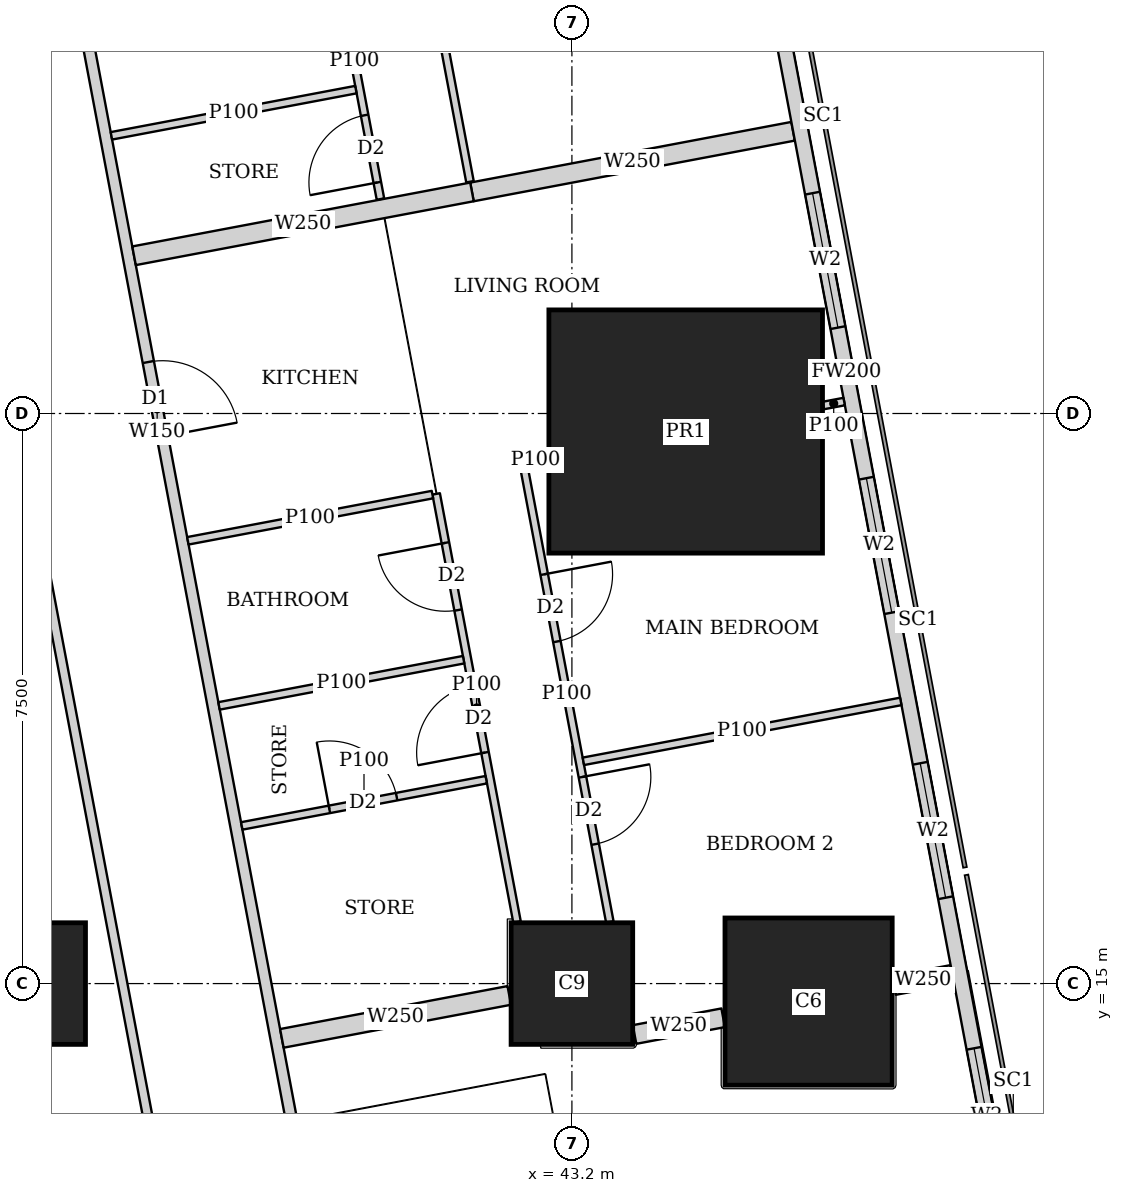
"""IFC4 building model, lengths in metres.
Left out: names, types, materials, properties, quantities, classifications, styles, units other than length and angle.
Written with IfcOpenShell. Run it as: python <this file> out.ifc"""

import sys

from ifc_helpers import new_model, si_unit, direction, frame, frame_2d, origin, origin_2d, place, context, subcontext, project, spatial, rectangle, extrude, element, fill, save


model = new_model("IFC4")
c1 = context("Model", 3, precision=1e-05, world=origin(), true_north=direction((0.0, 1.0)))
c2 = subcontext(c1, "Body", "Model", "MODEL_VIEW")
j1 = project(units=[si_unit("LENGTHUNIT", "METRE"), si_unit("PLANEANGLEUNIT", "RADIAN")], contexts=[c1])
p1 = place(None, origin())
s1 = spatial("IfcSite", under=j1, at=p1, CompositionType="ELEMENT")
p2 = place(p1, origin())
s2 = spatial("IfcBuilding", under=s1, at=p2, CompositionType="ELEMENT")
p3 = place(p2, frame((0.0, 0.0, 126.65)))
s3 = spatial("IfcBuildingStorey", under=s2, at=p3, CompositionType="ELEMENT", Elevation=126.65)
for number, where, z_axis, x_axis in (
    (1, (36.0, 15.0, 0.0), (0.0, 0.0, 1.0), (1.0, 0.0, 0.0)),
    (2, (43.2, 15.0, 0.0), (0.0, 0.0, 1.0), (1.0, 0.0, 0.0)),
):
    element("IfcColumn", number, at=place(p3, frame(where, z_axis=z_axis, x_axis=x_axis)), inside=s3, PredefinedType="COLUMN", context=c2, shape_type="SweptSolid", body=[
        extrude(rectangle(XDim=1.6, YDim=1.6, at=origin_2d()), origin(), (0.0, 0.0, 1.0), 3.75),
    ])
p4 = place(p3, frame((46.314, 14.763, 0.0), z_axis=(0.0, 0.0, 1.0), x_axis=(1.0, 0.0, 0.0)))
e3 = element("IfcColumn", 3, at=p4, inside=s3, PredefinedType="COLUMN", context=c2, shape_type="SweptSolid", body=[
    extrude(rectangle(XDim=2.2, YDim=2.2, at=origin_2d()), origin(), (0.0, 0.0, 1.0), 3.75),
])
p5 = place(p3, frame((44.697, 22.263, 0.0), z_axis=(0.0, 0.0, 1.0), x_axis=(1.0, 0.0, 0.0)))
e4 = element("IfcColumn", 4, at=p5, inside=s3, PredefinedType="COLUMN", context=c2, shape_type="SweptSolid", body=[
    extrude(rectangle(XDim=3.6, YDim=3.2, at=origin_2d()), origin(), (0.0, 0.0, 1.0), 3.75),
])
p6 = place(p3, frame((50.653, 2.703, 0.0), z_axis=(0.0, 0.0, 1.0), x_axis=(-0.185612026696, 0.982623109613, 0.0)))
e5 = element("IfcWall", 5, at=p6, inside=s3, PredefinedType="SOLIDWALL", context=c2, shape_type="SweptSolid", body=[
    extrude(rectangle(XDim=41.393, YDim=0.2, at=frame_2d((20.697, 0.0))), origin(), (0.0, 0.0, 1.0), 3.45),
])
p7 = place(p6, frame((1.633, 0.0, 0.9)))
e6 = element("IfcOpeningElement", 6, at=p7, cuts=e5, PredefinedType="OPENING", context=c2, shape_type="SweptSolid", body=[
    extrude(rectangle(XDim=1.8, YDim=1.5, at=frame_2d((0.9, 0.75))), frame((0.0, 0.11, 0.0), z_axis=(0.0, -1.0, 0.0), x_axis=(1.0, 0.0, 0.0)), (0.0, 0.0, 1.0), 0.22),
])
p8 = place(p6, frame((6.032, 0.0, 0.9)))
e7 = element("IfcOpeningElement", 7, at=p8, cuts=e5, PredefinedType="OPENING", context=c2, shape_type="SweptSolid", body=[
    extrude(rectangle(XDim=1.8, YDim=1.5, at=frame_2d((0.9, 0.75))), frame((0.0, 0.11, 0.0), z_axis=(0.0, -1.0, 0.0), x_axis=(1.0, 0.0, 0.0)), (0.0, 0.0, 1.0), 0.22),
])
p9 = place(p6, frame((9.848, 0.0, 0.9)))
e8 = element("IfcOpeningElement", 8, at=p9, cuts=e5, PredefinedType="OPENING", context=c2, shape_type="SweptSolid", body=[
    extrude(rectangle(XDim=1.8, YDim=1.5, at=frame_2d((0.9, 0.75))), frame((0.0, 0.11, 0.0), z_axis=(0.0, -1.0, 0.0), x_axis=(1.0, 0.0, 0.0)), (0.0, 0.0, 1.0), 0.22),
])
p10 = place(p6, frame((13.664, 0.0, 0.9)))
e9 = element("IfcOpeningElement", 9, at=p10, cuts=e5, PredefinedType="OPENING", context=c2, shape_type="SweptSolid", body=[
    extrude(rectangle(XDim=1.8, YDim=1.5, at=frame_2d((0.9, 0.75))), frame((0.0, 0.11, 0.0), z_axis=(0.0, -1.0, 0.0), x_axis=(1.0, 0.0, 0.0)), (0.0, 0.0, 1.0), 0.22),
])
p11 = place(p6, frame((17.481, 0.0, 0.9)))
e10 = element("IfcOpeningElement", 10, at=p11, cuts=e5, PredefinedType="OPENING", context=c2, shape_type="SweptSolid", body=[
    extrude(rectangle(XDim=1.8, YDim=1.5, at=frame_2d((0.9, 0.75))), frame((0.0, 0.11, 0.0), z_axis=(0.0, -1.0, 0.0), x_axis=(1.0, 0.0, 0.0)), (0.0, 0.0, 1.0), 0.22),
])
p12 = place(p6, frame((21.297, 0.0, 0.9)))
e11 = element("IfcOpeningElement", 11, at=p12, cuts=e5, PredefinedType="OPENING", context=c2, shape_type="SweptSolid", body=[
    extrude(rectangle(XDim=1.8, YDim=1.5, at=frame_2d((0.9, 0.75))), frame((0.0, 0.11, 0.0), z_axis=(0.0, -1.0, 0.0), x_axis=(1.0, 0.0, 0.0)), (0.0, 0.0, 1.0), 0.22),
])
p13 = place(p6, frame((25.113, 0.0, 0.9)))
e12 = element("IfcOpeningElement", 12, at=p13, cuts=e5, PredefinedType="OPENING", context=c2, shape_type="SweptSolid", body=[
    extrude(rectangle(XDim=1.8, YDim=1.5, at=frame_2d((0.9, 0.75))), frame((0.0, 0.11, 0.0), z_axis=(0.0, -1.0, 0.0), x_axis=(1.0, 0.0, 0.0)), (0.0, 0.0, 1.0), 0.22),
])
p14 = place(p6, frame((28.93, 0.0, 0.9)))
e13 = element("IfcOpeningElement", 13, at=p14, cuts=e5, PredefinedType="OPENING", context=c2, shape_type="SweptSolid", body=[
    extrude(rectangle(XDim=1.8, YDim=1.5, at=frame_2d((0.9, 0.75))), frame((0.0, 0.11, 0.0), z_axis=(0.0, -1.0, 0.0), x_axis=(1.0, 0.0, 0.0)), (0.0, 0.0, 1.0), 0.22),
])
p15 = place(p6, frame((32.746, 0.0, 0.9)))
e14 = element("IfcOpeningElement", 14, at=p15, cuts=e5, PredefinedType="OPENING", context=c2, shape_type="SweptSolid", body=[
    extrude(rectangle(XDim=1.8, YDim=1.5, at=frame_2d((0.9, 0.75))), frame((0.0, 0.11, 0.0), z_axis=(0.0, -1.0, 0.0), x_axis=(1.0, 0.0, 0.0)), (0.0, 0.0, 1.0), 0.22),
])
p16 = place(p6, frame((36.481, 0.0, 0.9)))
e15 = element("IfcOpeningElement", 15, at=p16, cuts=e5, PredefinedType="OPENING", context=c2, shape_type="SweptSolid", body=[
    extrude(rectangle(XDim=1.8, YDim=1.5, at=frame_2d((0.9, 0.75))), frame((0.0, 0.11, 0.0), z_axis=(0.0, -1.0, 0.0), x_axis=(1.0, 0.0, 0.0)), (0.0, 0.0, 1.0), 0.22),
])
p17 = place(p3, frame((33.896, 42.929, 0.0), z_axis=(0.0, 0.0, 1.0), x_axis=(0.1855961604, -0.982626106535, 0.0)))
e16 = element("IfcWall", 16, at=p17, inside=s3, PredefinedType="SOLIDWALL", context=c2, shape_type="SweptSolid", body=[
    extrude(rectangle(XDim=41.456, YDim=0.15, at=frame_2d((20.728, 0.0))), origin(), (0.0, 0.0, 1.0), 2.45),
])
p18 = place(p17, frame((7.893, 0.0, 0.0)))
e17 = element("IfcOpeningElement", 17, at=p18, cuts=e16, PredefinedType="OPENING", context=c2, shape_type="SweptSolid", body=[
    extrude(rectangle(XDim=1.0, YDim=2.1, at=frame_2d((0.5, 1.05))), frame((0.0, 0.085, 0.0), z_axis=(0.0, -1.0, 0.0), x_axis=(1.0, 0.0, 0.0)), (0.0, 0.0, 1.0), 0.17),
])
p19 = place(p17, frame((12.468, 0.0, 0.0)))
e18 = element("IfcOpeningElement", 18, at=p19, cuts=e16, PredefinedType="OPENING", context=c2, shape_type="SweptSolid", body=[
    extrude(rectangle(XDim=1.0, YDim=2.1, at=frame_2d((0.5, 1.05))), frame((0.0, 0.085, 0.0), z_axis=(0.0, -1.0, 0.0), x_axis=(1.0, 0.0, 0.0)), (0.0, 0.0, 1.0), 0.17),
])
p20 = place(p17, frame((20.101, 0.0, 0.0)))
e19 = element("IfcOpeningElement", 19, at=p20, cuts=e16, PredefinedType="OPENING", context=c2, shape_type="SweptSolid", body=[
    extrude(rectangle(XDim=1.0, YDim=2.1, at=frame_2d((0.5, 1.05))), frame((0.0, 0.085, 0.0), z_axis=(0.0, -1.0, 0.0), x_axis=(1.0, 0.0, 0.0)), (0.0, 0.0, 1.0), 0.17),
])
p21 = place(p17, frame((31.064, 0.0, 0.0)))
e20 = element("IfcOpeningElement", 20, at=p21, cuts=e16, PredefinedType="OPENING", context=c2, shape_type="SweptSolid", body=[
    extrude(rectangle(XDim=1.0, YDim=2.1, at=frame_2d((0.5, 1.05))), frame((0.0, 0.085, 0.0), z_axis=(0.0, -1.0, 0.0), x_axis=(1.0, 0.0, 0.0)), (0.0, 0.0, 1.0), 0.17),
])
p22 = place(p3, frame((41.156, 29.273, 0.0), z_axis=(0.0, 0.0, 1.0), x_axis=(0.185474762472, -0.982649028131, 0.0)))
e21 = element("IfcWall", 21, at=p22, inside=s3, PredefinedType="PARTITIONING", context=c2, shape_type="SweptSolid", body=[
    extrude(rectangle(XDim=3.79, YDim=0.1, at=frame_2d((1.895, 0.0))), origin(), (0.0, 0.0, 1.0), 2.45),
])
p23 = place(p22, frame((0.9, 0.0, 0.0)))
e22 = element("IfcOpeningElement", 22, at=p23, cuts=e21, PredefinedType="OPENING", context=c2, shape_type="SweptSolid", body=[
    extrude(rectangle(XDim=0.9, YDim=2.1, at=frame_2d((0.45, 1.05))), frame((0.0, 0.06, 0.0), z_axis=(0.0, -1.0, 0.0), x_axis=(1.0, 0.0, 0.0)), (0.0, 0.0, 1.0), 0.12),
])
p24 = place(p3, frame((39.997, 28.942, 0.0), z_axis=(0.0, 0.0, 1.0), x_axis=(0.185580474845, -0.982629069057, 0.0)))
e23 = element("IfcWall", 23, at=p24, inside=s3, PredefinedType="PARTITIONING", context=c2, shape_type="SweptSolid", body=[
    extrude(rectangle(XDim=3.685, YDim=0.1, at=frame_2d((1.842, 0.0))), origin(), (0.0, 0.0, 1.0), 3.45),
])
p25 = place(p24, frame((0.655, 0.0, 0.0)))
e24 = element("IfcOpeningElement", 24, at=p25, cuts=e23, PredefinedType="OPENING", context=c2, shape_type="SweptSolid", body=[
    extrude(rectangle(XDim=0.9, YDim=2.1, at=frame_2d((0.45, 1.05))), frame((0.0, 0.06, 0.0), z_axis=(0.0, -1.0, 0.0), x_axis=(1.0, 0.0, 0.0)), (0.0, 0.0, 1.0), 0.12),
])
p26 = place(p24, frame((2.563, 0.0, 0.0)))
e25 = element("IfcOpeningElement", 25, at=p26, cuts=e23, PredefinedType="OPENING", context=c2, shape_type="SweptSolid", body=[
    extrude(rectangle(XDim=0.9, YDim=2.1, at=frame_2d((0.45, 1.05))), frame((0.0, 0.06, 0.0), z_axis=(0.0, -1.0, 0.0), x_axis=(1.0, 0.0, 0.0)), (0.0, 0.0, 1.0), 0.12),
])
p27 = place(p3, frame((40.358, 26.761, 0.0), z_axis=(0.0, 0.0, 1.0), x_axis=(-0.982607776398, -0.185693181787, 0.0)))
e26 = element("IfcWall", 26, at=p27, inside=s3, PredefinedType="PARTITIONING", context=c2, shape_type="SweptSolid", body=[
    extrude(rectangle(XDim=3.274, YDim=0.1, at=frame_2d((1.637, 0.0))), origin(), (0.0, 0.0, 1.0), 3.45),
])
p28 = place(p3, frame((42.566, 21.809, 0.0), z_axis=(0.0, 0.0, 1.0), x_axis=(0.18559218796, -0.982626856832, 0.0)))
e27 = element("IfcWall", 27, at=p28, inside=s3, PredefinedType="PARTITIONING", context=c2, shape_type="SweptSolid", body=[
    extrude(rectangle(XDim=6.105, YDim=0.1, at=frame_2d((3.052, 0.0))), origin(), (0.0, 0.0, 1.0), 2.45),
])
p29 = place(p28, frame((1.45, 0.0, 0.0)))
e28 = element("IfcOpeningElement", 28, at=p29, cuts=e27, PredefinedType="OPENING", context=c2, shape_type="SweptSolid", body=[
    extrude(rectangle(XDim=0.9, YDim=2.1, at=frame_2d((0.45, 1.05))), frame((0.0, 0.06, 0.0), z_axis=(0.0, -1.0, 0.0), x_axis=(1.0, 0.0, 0.0)), (0.0, 0.0, 1.0), 0.12),
])
p30 = place(p28, frame((4.163, 0.0, 0.0)))
e29 = element("IfcOpeningElement", 29, at=p30, cuts=e27, PredefinedType="OPENING", context=c2, shape_type="SweptSolid", body=[
    extrude(rectangle(XDim=0.9, YDim=2.1, at=frame_2d((0.45, 1.05))), frame((0.0, 0.06, 0.0), z_axis=(0.0, -1.0, 0.0), x_axis=(1.0, 0.0, 0.0)), (0.0, 0.0, 1.0), 0.12),
])
p31 = place(p3, frame((41.414, 21.442, 0.0), z_axis=(0.0, 0.0, 1.0), x_axis=(0.185636022079, -0.982618576716, 0.0)))
e30 = element("IfcWall", 30, at=p31, inside=s3, PredefinedType="PARTITIONING", context=c2, shape_type="SweptSolid", body=[
    extrude(rectangle(XDim=5.731, YDim=0.1, at=frame_2d((2.866, 0.0))), origin(), (0.0, 0.0, 1.0), 3.45),
])
p32 = place(p31, frame((0.655, 0.0, 0.0)))
e31 = element("IfcOpeningElement", 31, at=p32, cuts=e30, PredefinedType="OPENING", context=c2, shape_type="SweptSolid", body=[
    extrude(rectangle(XDim=0.9, YDim=2.1, at=frame_2d((0.45, 1.05))), frame((0.0, 0.06, 0.0), z_axis=(0.0, -1.0, 0.0), x_axis=(1.0, 0.0, 0.0)), (0.0, 0.0, 1.0), 0.12),
])
p33 = place(p31, frame((2.563, 0.0, 0.0)))
e32 = element("IfcOpeningElement", 32, at=p33, cuts=e30, PredefinedType="OPENING", context=c2, shape_type="SweptSolid", body=[
    extrude(rectangle(XDim=0.9, YDim=2.1, at=frame_2d((0.45, 1.05))), frame((0.0, 0.06, 0.0), z_axis=(0.0, -1.0, 0.0), x_axis=(1.0, 0.0, 0.0)), (0.0, 0.0, 1.0), 0.12),
])
p34 = place(p3, frame((46.782, 22.657, 0.0), z_axis=(0.0, 0.0, 1.0), x_axis=(-0.982574553168, -0.185868898601, 0.0)))
e33 = element("IfcWall", 33, at=p34, inside=s3, PredefinedType="PARTITIONING", context=c2, shape_type="SweptSolid", body=[
    extrude(rectangle(XDim=0.28, YDim=0.1, at=frame_2d((0.14, 0.0))), origin(), (0.0, 0.0, 1.0), 3.45),
])
p35 = place(p3, frame((42.887, 21.921, 0.0), z_axis=(0.0, 0.0, 1.0), x_axis=(-0.982274918032, -0.187445953293, 0.0)))
e34 = element("IfcWall", 34, at=p35, inside=s3, PredefinedType="PARTITIONING", context=c2, shape_type="SweptSolid", body=[
    extrude(rectangle(XDim=0.336, YDim=0.1, at=frame_2d((0.168, 0.0))), origin(), (0.0, 0.0, 1.0), 2.45),
])
p36 = place(p3, frame((47.527, 18.712, 0.0), z_axis=(0.0, 0.0, 1.0), x_axis=(-0.982665405803, -0.185387972203, 0.0)))
e35 = element("IfcWall", 35, at=p36, inside=s3, PredefinedType="PARTITIONING", context=c2, shape_type="SweptSolid", body=[
    extrude(rectangle(XDim=4.25, YDim=0.1, at=frame_2d((2.125, 0.0))), origin(), (0.0, 0.0, 1.0), 2.15),
])
p37 = place(p3, frame((41.365, 21.433, 0.0), z_axis=(0.0, 0.0, 1.0), x_axis=(-0.982607026909, -0.185697147715, 0.0)))
e36 = element("IfcWall", 36, at=p37, inside=s3, PredefinedType="PARTITIONING", context=c2, shape_type="SweptSolid", body=[
    extrude(rectangle(XDim=3.275, YDim=0.1, at=frame_2d((1.637, 0.0))), origin(), (0.0, 0.0, 1.0), 3.45),
])
p38 = place(p3, frame((42.073, 17.682, 0.0), z_axis=(0.0, 0.0, 1.0), x_axis=(-0.982610347627, -0.185679575441, 0.0)))
e37 = element("IfcWall", 37, at=p38, inside=s3, PredefinedType="PARTITIONING", context=c2, shape_type="SweptSolid", body=[
    extrude(rectangle(XDim=3.274, YDim=0.1, at=frame_2d((1.637, 0.0))), origin(), (0.0, 0.0, 1.0), 3.45),
])
p39 = place(p38, frame((1.2, 0.0, 0.0)))
e38 = element("IfcOpeningElement", 38, at=p39, cuts=e37, PredefinedType="OPENING", context=c2, shape_type="SweptSolid", body=[
    extrude(rectangle(XDim=0.9, YDim=2.1, at=frame_2d((0.45, 1.05))), frame((0.0, 0.06, 0.0), z_axis=(0.0, -1.0, 0.0), x_axis=(1.0, 0.0, 0.0)), (0.0, 0.0, 1.0), 0.12),
])
p40 = place(p3, frame((41.775, 19.261, 0.0), z_axis=(0.0, 0.0, 1.0), x_axis=(-0.982620626894, -0.185625169636, 0.0)))
e39 = element("IfcWall", 39, at=p40, inside=s3, PredefinedType="PARTITIONING", context=c2, shape_type="SweptSolid", body=[
    extrude(rectangle(XDim=3.275, YDim=0.1, at=frame_2d((1.637, 0.0))), origin(), (0.0, 0.0, 1.0), 3.45),
])
p41 = place(p3, frame((46.11, 26.213, 0.0), z_axis=(0.0, 0.0, 1.0), x_axis=(-0.982633535512, -0.185556823879, 0.0)))
e40 = element("IfcWall", 40, at=p41, inside=s3, PredefinedType="SOLIDWALL", context=c2, shape_type="SweptSolid", body=[
    extrude(rectangle(XDim=4.3, YDim=0.25, at=frame_2d((2.15, 0.0))), origin(), (0.0, 0.0, 1.0), 2.15),
])
p42 = place(p3, frame((41.885, 25.415, 0.0), z_axis=(0.0, 0.0, 1.0), x_axis=(-0.982612837616, -0.185666398014, 0.0)))
e41 = element("IfcWall", 41, at=p42, inside=s3, PredefinedType="SOLIDWALL", context=c2, shape_type="SweptSolid", body=[
    extrude(rectangle(XDim=4.525, YDim=0.25, at=frame_2d((2.262, 0.0))), origin(), (0.0, 0.0, 1.0), 3.45),
])
p43 = place(p3, frame((48.206, 15.12, 0.0), z_axis=(0.0, 0.0, 1.0), x_axis=(-0.982638023929, -0.185533053469, 0.0)))
e42 = element("IfcWall", 42, at=p43, inside=s3, PredefinedType="SOLIDWALL", context=c2, shape_type="SweptSolid", body=[
    extrude(rectangle(XDim=0.782, YDim=0.25, at=frame_2d((0.391, 0.0))), origin(), (0.0, 0.0, 1.0), 3.45),
])
p44 = place(p3, frame((45.19, 14.55, 0.0), z_axis=(0.0, 0.0, 1.0), x_axis=(-0.982666604435, -0.185381618634, 0.0)))
e43 = element("IfcWall", 43, at=p44, inside=s3, PredefinedType="SOLIDWALL", context=c2, shape_type="SweptSolid", body=[
    extrude(rectangle(XDim=1.187, YDim=0.25, at=frame_2d((0.593, 0.0))), origin(), (0.0, 0.0, 1.0), 3.45),
])
p45 = place(p3, frame((42.376, 14.844, 0.0), z_axis=(0.0, 0.0, 1.0), x_axis=(-0.982636286056, -0.185542257522, 0.0)))
e44 = element("IfcWall", 44, at=p45, inside=s3, PredefinedType="SOLIDWALL", context=c2, shape_type="SweptSolid", body=[
    extrude(rectangle(XDim=3.045, YDim=0.25, at=frame_2d((1.522, 0.0))), origin(), (0.0, 0.0, 1.0), 3.45),
])
p46 = place(p3, frame((38.202, 10.163, 0.0), z_axis=(0.0, 0.0, 1.0), x_axis=(-0.185610321132, 0.982623431783, 0.0)))
e45 = element("IfcWall", 45, at=p46, inside=s3, PredefinedType="PARTITIONING", context=c2, shape_type="SweptSolid", body=[
    extrude(rectangle(XDim=25.111, YDim=0.125, at=frame_2d((12.556, 0.0))), origin(), (0.0, 0.0, 1.0), 2.45),
])
p47 = place(p46, frame((0.708, 0.0, 0.0)))
e46 = element("IfcOpeningElement", 46, at=p47, cuts=e45, PredefinedType="OPENING", context=c2, shape_type="SweptSolid", body=[
    extrude(rectangle(XDim=1.0, YDim=2.1, at=frame_2d((0.5, 1.05))), frame((0.0, 0.073, 0.0), z_axis=(0.0, -1.0, 0.0), x_axis=(1.0, 0.0, 0.0)), (0.0, 0.0, 1.0), 0.145),
])
p48 = place(p46, frame((13.378, 0.0, 0.0)))
e47 = element("IfcOpeningElement", 47, at=p48, cuts=e45, PredefinedType="OPENING", context=c2, shape_type="SweptSolid", body=[
    extrude(rectangle(XDim=1.0, YDim=2.1, at=frame_2d((0.5, 1.05))), frame((0.0, 0.073, 0.0), z_axis=(0.0, -1.0, 0.0), x_axis=(1.0, 0.0, 0.0)), (0.0, 0.0, 1.0), 0.145),
])
p49 = place(p46, frame((21.25, 0.0, 0.0)))
e48 = element("IfcOpeningElement", 48, at=p49, cuts=e45, PredefinedType="OPENING", context=c2, shape_type="SweptSolid", body=[
    extrude(rectangle(XDim=1.0, YDim=2.1, at=frame_2d((0.5, 1.05))), frame((0.0, 0.073, 0.0), z_axis=(0.0, -1.0, 0.0), x_axis=(1.0, 0.0, 0.0)), (0.0, 0.0, 1.0), 0.145),
])
p50 = place(p46, frame((23.453, 0.0, 0.0)))
e49 = element("IfcOpeningElement", 49, at=p50, cuts=e45, PredefinedType="OPENING", context=c2, shape_type="SweptSolid", body=[
    extrude(rectangle(XDim=1.0, YDim=2.1, at=frame_2d((0.5, 1.05))), frame((0.0, 0.073, 0.0), z_axis=(0.0, -1.0, 0.0), x_axis=(1.0, 0.0, 0.0)), (0.0, 0.0, 1.0), 0.145),
])
p51 = place(p9, origin())
e50 = element("IfcWindow", 50, at=p51, inside=s3, PartitioningType="SINGLE_PANEL", PredefinedType="WINDOW", context=c2, shape_type="SweptSolid", body=[
    extrude(rectangle(XDim=1.8, YDim=1.5, at=frame_2d((0.9, 0.75))), frame((0.0, 0.03, 0.0), z_axis=(0.0, -1.0, 0.0), x_axis=(1.0, 0.0, 0.0)), (0.0, 0.0, 1.0), 0.06),
])
fill(e8, e50)
p52 = place(p10, origin())
e51 = element("IfcWindow", 51, at=p52, inside=s3, PartitioningType="SINGLE_PANEL", PredefinedType="WINDOW", context=c2, shape_type="SweptSolid", body=[
    extrude(rectangle(XDim=1.8, YDim=1.5, at=frame_2d((0.9, 0.75))), frame((0.0, 0.03, 0.0), z_axis=(0.0, -1.0, 0.0), x_axis=(1.0, 0.0, 0.0)), (0.0, 0.0, 1.0), 0.06),
])
fill(e9, e51)
p53 = place(p11, origin())
e52 = element("IfcWindow", 52, at=p53, inside=s3, PartitioningType="SINGLE_PANEL", PredefinedType="WINDOW", context=c2, shape_type="SweptSolid", body=[
    extrude(rectangle(XDim=1.8, YDim=1.5, at=frame_2d((0.9, 0.75))), frame((0.0, 0.03, 0.0), z_axis=(0.0, -1.0, 0.0), x_axis=(1.0, 0.0, 0.0)), (0.0, 0.0, 1.0), 0.06),
])
fill(e10, e52)
p54 = place(p12, origin())
e53 = element("IfcWindow", 53, at=p54, inside=s3, PartitioningType="SINGLE_PANEL", PredefinedType="WINDOW", context=c2, shape_type="SweptSolid", body=[
    extrude(rectangle(XDim=1.8, YDim=1.5, at=frame_2d((0.9, 0.75))), frame((0.0, 0.03, 0.0), z_axis=(0.0, -1.0, 0.0), x_axis=(1.0, 0.0, 0.0)), (0.0, 0.0, 1.0), 0.06),
])
fill(e11, e53)
p55 = place(p26, origin())
e54 = element("IfcDoor", 54, at=p55, inside=s3, OperationType="SINGLE_SWING_LEFT", PredefinedType="DOOR", context=c2, shape_type="SweptSolid", body=[
    extrude(rectangle(XDim=0.9, YDim=2.1, at=frame_2d((0.45, 1.05))), frame((0.0, 0.025, 0.0), z_axis=(0.0, -1.0, 0.0), x_axis=(1.0, 0.0, 0.0)), (0.0, 0.0, 1.0), 0.05),
])
fill(e25, e54)
p56 = place(p29, origin())
e55 = element("IfcDoor", 55, at=p56, inside=s3, OperationType="SINGLE_SWING_LEFT", PredefinedType="DOOR", context=c2, shape_type="SweptSolid", body=[
    extrude(rectangle(XDim=0.9, YDim=2.1, at=frame_2d((0.45, 1.05))), frame((0.0, 0.025, 0.0), z_axis=(0.0, -1.0, 0.0), x_axis=(1.0, 0.0, 0.0)), (0.0, 0.0, 1.0), 0.05),
])
fill(e28, e55)
p57 = place(p30, origin())
e56 = element("IfcDoor", 56, at=p57, inside=s3, OperationType="SINGLE_SWING_LEFT", PredefinedType="DOOR", context=c2, shape_type="SweptSolid", body=[
    extrude(rectangle(XDim=0.9, YDim=2.1, at=frame_2d((0.45, 1.05))), frame((0.0, 0.025, 0.0), z_axis=(0.0, -1.0, 0.0), x_axis=(1.0, 0.0, 0.0)), (0.0, 0.0, 1.0), 0.05),
])
fill(e29, e56)
p58 = place(p32, origin())
e57 = element("IfcDoor", 57, at=p58, inside=s3, OperationType="SINGLE_SWING_RIGHT", PredefinedType="DOOR", context=c2, shape_type="SweptSolid", body=[
    extrude(rectangle(XDim=0.9, YDim=2.1, at=frame_2d((0.45, 1.05))), frame((0.0, 0.025, 0.0), z_axis=(0.0, -1.0, 0.0), x_axis=(1.0, 0.0, 0.0)), (0.0, 0.0, 1.0), 0.05),
])
fill(e31, e57)
p59 = place(p33, origin())
e58 = element("IfcDoor", 58, at=p59, inside=s3, OperationType="SINGLE_SWING_LEFT", PredefinedType="DOOR", context=c2, shape_type="SweptSolid", body=[
    extrude(rectangle(XDim=0.9, YDim=2.1, at=frame_2d((0.45, 1.05))), frame((0.0, 0.025, 0.0), z_axis=(0.0, -1.0, 0.0), x_axis=(1.0, 0.0, 0.0)), (0.0, 0.0, 1.0), 0.05),
])
fill(e32, e58)
p60 = place(p20, origin())
e59 = element("IfcDoor", 59, at=p60, inside=s3, OperationType="SINGLE_SWING_RIGHT", PredefinedType="DOOR", context=c2, shape_type="SweptSolid", body=[
    extrude(rectangle(XDim=1.0, YDim=2.1, at=frame_2d((0.5, 1.05))), frame((0.0, 0.025, 0.0), z_axis=(0.0, -1.0, 0.0), x_axis=(1.0, 0.0, 0.0)), (0.0, 0.0, 1.0), 0.05),
])
fill(e19, e59)
p61 = place(p39, origin())
e60 = element("IfcDoor", 60, at=p61, inside=s3, OperationType="SINGLE_SWING_LEFT", PredefinedType="DOOR", context=c2, shape_type="SweptSolid", body=[
    extrude(rectangle(XDim=0.9, YDim=2.1, at=frame_2d((0.45, 1.05))), frame((0.0, 0.025, 0.0), z_axis=(0.0, -1.0, 0.0), x_axis=(1.0, 0.0, 0.0)), (0.0, 0.0, 1.0), 0.05),
])
fill(e38, e60)
save(model, sys.argv[1])
